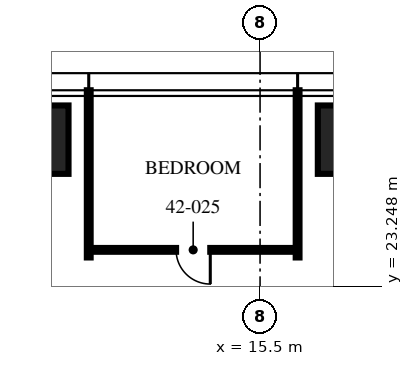
"""IFC4 building model, lengths in metres.
Left out: names, types, materials, properties, quantities, classifications, styles, units other than length and angle.
Written with IfcOpenShell. Run it as: python <this file> out.ifc"""

import sys

from ifc_helpers import new_model, si_unit, direction, frame, frame_2d, origin, origin_2d, place, context, subcontext, project, spatial, rectangle, extrude, element, fill, save


model = new_model("IFC4")
c1 = context("Model", 3, precision=1e-05, world=origin(), true_north=direction((0.0, 1.0)))
c2 = subcontext(c1, "Body", "Model", "MODEL_VIEW")
j1 = project(units=[si_unit("LENGTHUNIT", "METRE"), si_unit("PLANEANGLEUNIT", "RADIAN")], contexts=[c1])
p1 = place(None, origin())
s1 = spatial("IfcSite", under=j1, at=p1, CompositionType="ELEMENT")
p2 = place(p1, origin())
s2 = spatial("IfcBuilding", under=s1, at=p2, CompositionType="ELEMENT")
p3 = place(p2, frame((0.0, 0.0, 167.25)))
s3 = spatial("IfcBuildingStorey", under=s2, at=p3, CompositionType="ELEMENT", Elevation=167.25)
for number, where, z_axis, x_axis in (
    (1, (9.16, 27.1, 0.0), (0.0, 0.0, 1.0), (1.0, 0.0, 0.0)),
    (2, (18.32, 27.1, 0.0), (0.0, 0.0, 1.0), (1.0, 0.0, 0.0)),
):
    element("IfcColumn", number, at=place(p3, frame(where, z_axis=z_axis, x_axis=x_axis)), inside=s3, PredefinedType="COLUMN", context=c2, shape_type="SweptSolid", body=[
        extrude(rectangle(XDim=2.6, YDim=1.8, at=origin_2d()), origin(), (0.0, 0.0, 1.0), 3.75),
    ])
for number, where, z_axis, x_axis in (
    (3, (16.488, 24.0, 0.0), (0.0, 0.0, 1.0), (0.0, 1.0, 0.0)),
    (4, (10.992, 24.0, 0.0), (0.0, 0.0, 1.0), (0.0, 1.0, 0.0)),
):
    element("IfcWall", number, at=place(p3, frame(where, z_axis=z_axis, x_axis=x_axis)), inside=s3, PredefinedType="PARTITIONING", context=c2, shape_type="SweptSolid", body=[
        extrude(rectangle(XDim=4.4, YDim=0.1, at=frame_2d((2.2, 0.0))), origin(), (0.0, 0.0, 1.0), 2.81),
    ])
p4 = place(p3, frame((16.488, 24.2, 0.0), z_axis=(0.0, 0.0, 1.0), x_axis=(-1.0, 0.0, 0.0)))
e5 = element("IfcWall", 5, at=p4, inside=s3, PredefinedType="PARTITIONING", context=c2, shape_type="SweptSolid", body=[
    extrude(rectangle(XDim=5.496, YDim=0.1, at=frame_2d((2.748, 0.0))), origin(), (0.0, 0.0, 1.0), 2.81),
])
p5 = place(p4, frame((2.298, 0.0, 0.0)))
e6 = element("IfcOpeningElement", 6, at=p5, cuts=e5, PredefinedType="OPENING", context=c2, shape_type="SweptSolid", body=[
    extrude(rectangle(XDim=0.9, YDim=2.1, at=frame_2d((0.45, 1.05))), frame((0.0, 0.06, 0.0), z_axis=(0.0, -1.0, 0.0), x_axis=(1.0, 0.0, 0.0)), (0.0, 0.0, 1.0), 0.12),
])
p6 = place(p5, origin())
e7 = element("IfcDoor", 7, at=p6, inside=s3, OperationType="SINGLE_SWING_LEFT", PredefinedType="DOOR", context=c2, shape_type="SweptSolid", body=[
    extrude(rectangle(XDim=0.9, YDim=2.1, at=frame_2d((0.45, 1.05))), frame((0.0, 0.025, 0.0), z_axis=(0.0, -1.0, 0.0), x_axis=(1.0, 0.0, 0.0)), (0.0, 0.0, 1.0), 0.05),
])
fill(e6, e7)
save(model, sys.argv[1])
